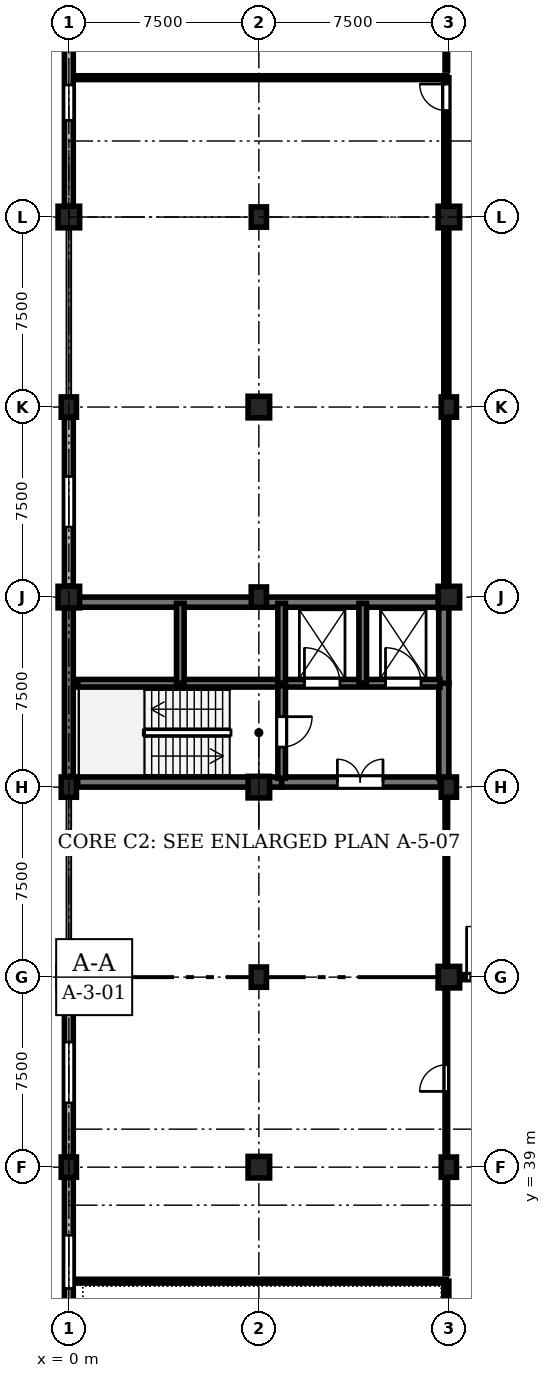
"""IFC4 building model, lengths in metres.
Left out: names, types, materials, properties, quantities, classifications, styles, units other than length and angle.
Written with IfcOpenShell. Run it as: python <this file> out.ifc"""

import sys

from ifc_helpers import new_model, si_unit, direction, frame, frame_2d, origin, origin_2d, place, context, subcontext, project, spatial, rectangle, extrude, element, fill, save


model = new_model("IFC4")
c1 = context("Model", 3, precision=1e-05, world=origin(), true_north=direction((0.0, 1.0)))
c2 = subcontext(c1, "Body", "Model", "MODEL_VIEW")
j1 = project(units=[si_unit("LENGTHUNIT", "METRE"), si_unit("PLANEANGLEUNIT", "RADIAN")], contexts=[c1])
p1 = place(None, origin())
s1 = spatial("IfcSite", under=j1, at=p1, CompositionType="ELEMENT")
p2 = place(p1, origin())
s2 = spatial("IfcBuilding", under=s1, at=p2, CompositionType="ELEMENT")
p3 = place(p2, frame((0.0, 0.0, 4.8)))
s3 = spatial("IfcBuildingStorey", under=s2, at=p3, CompositionType="ELEMENT", Elevation=4.8)
p4 = place(p3, frame((0.0, 39.0, 0.0), z_axis=(0.0, 0.0, 1.0), x_axis=(1.0, 0.0, 0.0)))
e1 = element("IfcColumn", 1, at=p4, inside=s3, PredefinedType="COLUMN", context=c2, shape_type="SweptSolid", body=[
    extrude(rectangle(XDim=0.6, YDim=0.8, at=origin_2d()), origin(), (0.0, 0.0, 1.0), 4.5),
])
p5 = place(p3, frame((0.0, 46.5, 0.0), z_axis=(0.0, 0.0, 1.0), x_axis=(1.0, 0.0, 0.0)))
e2 = element("IfcColumn", 2, at=p5, inside=s3, PredefinedType="COLUMN", context=c2, shape_type="SweptSolid", body=[
    extrude(rectangle(XDim=0.85, YDim=0.85, at=origin_2d()), origin(), (0.0, 0.0, 1.0), 4.5),
])
p6 = place(p3, frame((0.0, 54.0, 0.0), z_axis=(0.0, 0.0, 1.0), x_axis=(1.0, 0.0, 0.0)))
e3 = element("IfcColumn", 3, at=p6, inside=s3, PredefinedType="COLUMN", context=c2, shape_type="SweptSolid", body=[
    extrude(rectangle(XDim=0.6, YDim=0.8, at=origin_2d()), origin(), (0.0, 0.0, 1.0), 4.5),
])
p7 = place(p3, frame((0.0, 61.5, 0.0), z_axis=(0.0, 0.0, 1.0), x_axis=(1.0, 0.0, 0.0)))
e4 = element("IfcColumn", 4, at=p7, inside=s3, PredefinedType="COLUMN", context=c2, shape_type="SweptSolid", body=[
    extrude(rectangle(XDim=0.85, YDim=0.85, at=origin_2d()), origin(), (0.0, 0.0, 1.0), 4.5),
])
p8 = place(p3, frame((0.0, 69.0, 0.0), z_axis=(0.0, 0.0, 1.0), x_axis=(1.0, 0.0, 0.0)))
e5 = element("IfcColumn", 5, at=p8, inside=s3, PredefinedType="COLUMN", context=c2, shape_type="SweptSolid", body=[
    extrude(rectangle(XDim=0.6, YDim=0.8, at=origin_2d()), origin(), (0.0, 0.0, 1.0), 4.5),
])
for number, where, z_axis, x_axis in (
    (6, (0.0, 76.5, 0.0), (0.0, 0.0, 1.0), (1.0, 0.0, 0.0)),
    (7, (7.5, 39.0, 0.0), (0.0, 0.0, 1.0), (1.0, 0.0, 0.0)),
):
    element("IfcColumn", number, at=place(p3, frame(where, z_axis=z_axis, x_axis=x_axis)), inside=s3, PredefinedType="COLUMN", context=c2, shape_type="SweptSolid", body=[
        extrude(rectangle(XDim=0.85, YDim=0.85, at=origin_2d()), origin(), (0.0, 0.0, 1.0), 4.5),
    ])
p9 = place(p3, frame((7.5, 46.5, 0.0), z_axis=(0.0, 0.0, 1.0), x_axis=(1.0, 0.0, 0.0)))
e8 = element("IfcColumn", 8, at=p9, inside=s3, PredefinedType="COLUMN", context=c2, shape_type="SweptSolid", body=[
    extrude(rectangle(XDim=0.6, YDim=0.8, at=origin_2d()), origin(), (0.0, 0.0, 1.0), 4.5),
])
p10 = place(p3, frame((7.5, 54.0, 0.0), z_axis=(0.0, 0.0, 1.0), x_axis=(1.0, 0.0, 0.0)))
e9 = element("IfcColumn", 9, at=p10, inside=s3, PredefinedType="COLUMN", context=c2, shape_type="SweptSolid", body=[
    extrude(rectangle(XDim=0.85, YDim=0.85, at=origin_2d()), origin(), (0.0, 0.0, 1.0), 4.5),
])
p11 = place(p3, frame((7.5, 61.5, 0.0), z_axis=(0.0, 0.0, 1.0), x_axis=(1.0, 0.0, 0.0)))
e10 = element("IfcColumn", 10, at=p11, inside=s3, PredefinedType="COLUMN", context=c2, shape_type="SweptSolid", body=[
    extrude(rectangle(XDim=0.6, YDim=0.8, at=origin_2d()), origin(), (0.0, 0.0, 1.0), 4.5),
])
p12 = place(p3, frame((7.5, 69.0, 0.0), z_axis=(0.0, 0.0, 1.0), x_axis=(1.0, 0.0, 0.0)))
e11 = element("IfcColumn", 11, at=p12, inside=s3, PredefinedType="COLUMN", context=c2, shape_type="SweptSolid", body=[
    extrude(rectangle(XDim=0.85, YDim=0.85, at=origin_2d()), origin(), (0.0, 0.0, 1.0), 4.5),
])
for number, where, z_axis, x_axis in (
    (12, (7.5, 76.5, 0.0), (0.0, 0.0, 1.0), (1.0, 0.0, 0.0)),
    (13, (15.0, 39.0, 0.0), (0.0, 0.0, 1.0), (1.0, 0.0, 0.0)),
):
    element("IfcColumn", number, at=place(p3, frame(where, z_axis=z_axis, x_axis=x_axis)), inside=s3, PredefinedType="COLUMN", context=c2, shape_type="SweptSolid", body=[
        extrude(rectangle(XDim=0.6, YDim=0.8, at=origin_2d()), origin(), (0.0, 0.0, 1.0), 4.5),
    ])
p13 = place(p3, frame((15.0, 46.5, 0.0), z_axis=(0.0, 0.0, 1.0), x_axis=(1.0, 0.0, 0.0)))
e14 = element("IfcColumn", 14, at=p13, inside=s3, PredefinedType="COLUMN", context=c2, shape_type="SweptSolid", body=[
    extrude(rectangle(XDim=0.85, YDim=0.85, at=origin_2d()), origin(), (0.0, 0.0, 1.0), 4.5),
])
p14 = place(p3, frame((15.0, 54.0, 0.0), z_axis=(0.0, 0.0, 1.0), x_axis=(1.0, 0.0, 0.0)))
e15 = element("IfcColumn", 15, at=p14, inside=s3, PredefinedType="COLUMN", context=c2, shape_type="SweptSolid", body=[
    extrude(rectangle(XDim=0.6, YDim=0.8, at=origin_2d()), origin(), (0.0, 0.0, 1.0), 4.5),
])
p15 = place(p3, frame((15.0, 61.5, 0.0), z_axis=(0.0, 0.0, 1.0), x_axis=(1.0, 0.0, 0.0)))
e16 = element("IfcColumn", 16, at=p15, inside=s3, PredefinedType="COLUMN", context=c2, shape_type="SweptSolid", body=[
    extrude(rectangle(XDim=0.85, YDim=0.85, at=origin_2d()), origin(), (0.0, 0.0, 1.0), 4.5),
])
p16 = place(p3, frame((15.0, 69.0, 0.0), z_axis=(0.0, 0.0, 1.0), x_axis=(1.0, 0.0, 0.0)))
e17 = element("IfcColumn", 17, at=p16, inside=s3, PredefinedType="COLUMN", context=c2, shape_type="SweptSolid", body=[
    extrude(rectangle(XDim=0.6, YDim=0.8, at=origin_2d()), origin(), (0.0, 0.0, 1.0), 4.5),
])
p17 = place(p3, frame((15.0, 76.5, 0.0), z_axis=(0.0, 0.0, 1.0), x_axis=(1.0, 0.0, 0.0)))
e18 = element("IfcColumn", 18, at=p17, inside=s3, PredefinedType="COLUMN", context=c2, shape_type="SweptSolid", body=[
    extrude(rectangle(XDim=0.85, YDim=0.85, at=origin_2d()), origin(), (0.0, 0.0, 1.0), 4.5),
])
p18 = place(p3, frame((0.0, 31.935, 0.0), z_axis=(0.0, 0.0, 1.0), x_axis=(0.0, 1.0, 0.0)))
e19 = element("IfcWall", 19, at=p18, inside=s3, PredefinedType="STANDARD", context=c2, shape_type="SweptSolid", body=[
    extrude(rectangle(XDim=6.655, YDim=0.35, at=frame_2d((3.328, 0.0))), origin(), (0.0, 0.0, 1.0), 3.63),
])
p19 = place(p18, frame((2.278, 0.0, 0.9)))
e20 = element("IfcOpeningElement", 20, at=p19, cuts=e19, PredefinedType="OPENING", context=c2, shape_type="SweptSolid", body=[
    extrude(rectangle(XDim=2.1, YDim=2.1, at=frame_2d((1.05, 1.05))), frame((0.0, 0.185, 0.0), z_axis=(0.0, -1.0, 0.0), x_axis=(1.0, 0.0, 0.0)), (0.0, 0.0, 1.0), 0.37),
])
p20 = place(p3, frame((0.0, 39.41, 0.0), z_axis=(0.0, 0.0, 1.0), x_axis=(0.0, 1.0, 0.0)))
e21 = element("IfcWall", 21, at=p20, inside=s3, PredefinedType="STANDARD", context=c2, shape_type="SweptSolid", body=[
    extrude(rectangle(XDim=6.655, YDim=0.35, at=frame_2d((3.328, 0.0))), origin(), (0.0, 0.0, 1.0), 3.63),
])
p21 = place(p20, frame((2.127, 0.0, 0.9)))
e22 = element("IfcOpeningElement", 22, at=p21, cuts=e21, PredefinedType="OPENING", context=c2, shape_type="SweptSolid", body=[
    extrude(rectangle(XDim=2.4, YDim=2.1, at=frame_2d((1.2, 1.05))), frame((0.0, 0.185, 0.0), z_axis=(0.0, -1.0, 0.0), x_axis=(1.0, 0.0, 0.0)), (0.0, 0.0, 1.0), 0.37),
])
p22 = place(p3, frame((0.0, 54.41, 0.0), z_axis=(0.0, 0.0, 1.0), x_axis=(0.0, 1.0, 0.0)))
e23 = element("IfcWall", 23, at=p22, inside=s3, PredefinedType="SHEAR", context=c2, shape_type="SweptSolid", body=[
    extrude(rectangle(XDim=6.655, YDim=0.35, at=frame_2d((3.328, 0.0))), origin(), (0.0, 0.0, 1.0), 4.18),
])
p23 = place(p3, frame((0.0, 61.935, 0.0), z_axis=(0.0, 0.0, 1.0), x_axis=(0.0, 1.0, 0.0)))
e24 = element("IfcWall", 24, at=p23, inside=s3, PredefinedType="STANDARD", context=c2, shape_type="SweptSolid", body=[
    extrude(rectangle(XDim=6.655, YDim=0.35, at=frame_2d((3.328, 0.0))), origin(), (0.0, 0.0, 1.0), 3.63),
])
p24 = place(p23, frame((2.327, 0.0, 0.9)))
e25 = element("IfcOpeningElement", 25, at=p24, cuts=e24, PredefinedType="OPENING", context=c2, shape_type="SweptSolid", body=[
    extrude(rectangle(XDim=2.0, YDim=1.95, at=frame_2d((1.0, 0.975))), frame((0.0, 0.185, 0.0), z_axis=(0.0, -1.0, 0.0), x_axis=(1.0, 0.0, 0.0)), (0.0, 0.0, 1.0), 0.37),
])
p25 = place(p3, frame((0.0, 76.935, 0.0), z_axis=(0.0, 0.0, 1.0), x_axis=(0.0, 1.0, 0.0)))
e26 = element("IfcWall", 26, at=p25, inside=s3, PredefinedType="STANDARD", context=c2, shape_type="SweptSolid", body=[
    extrude(rectangle(XDim=8.155, YDim=0.35, at=frame_2d((4.078, 0.0))), origin(), (0.0, 0.0, 1.0), 3.63),
])
p26 = place(p25, frame((3.377, 0.0, 0.9)))
e27 = element("IfcOpeningElement", 27, at=p26, cuts=e26, PredefinedType="OPENING", context=c2, shape_type="SweptSolid", body=[
    extrude(rectangle(XDim=1.4, YDim=1.8, at=frame_2d((0.7, 0.9))), frame((0.0, 0.185, 0.0), z_axis=(0.0, -1.0, 0.0), x_axis=(1.0, 0.0, 0.0)), (0.0, 0.0, 1.0), 0.37),
])
p27 = place(p3, frame((0.35, 54.2, 0.0), z_axis=(0.0, 0.0, 1.0), x_axis=(1.0, 0.0, 0.0)))
e28 = element("IfcWall", 28, at=p27, inside=s3, PredefinedType="SHEAR", context=c2, shape_type="SweptSolid", body=[
    extrude(rectangle(XDim=8.05, YDim=0.4, at=frame_2d((4.025, 0.0))), origin(), (0.0, 0.0, 1.0), 4.18),
])
p28 = place(p3, frame((8.4, 54.2, 0.0), z_axis=(0.0, 0.0, 1.0), x_axis=(1.0, 0.0, 0.0)))
e29 = element("IfcWall", 29, at=p28, inside=s3, PredefinedType="SHEAR", context=c2, shape_type="SweptSolid", body=[
    extrude(rectangle(XDim=6.25, YDim=0.4, at=frame_2d((3.125, 0.0))), origin(), (0.0, 0.0, 1.0), 4.18),
])
p29 = place(p28, frame((2.2, 0.0, 0.0)))
e30 = element("IfcOpeningElement", 30, at=p29, cuts=e29, PredefinedType="OPENING", context=c2, shape_type="SweptSolid", body=[
    extrude(rectangle(XDim=1.8, YDim=2.25, at=frame_2d((0.9, 1.125))), frame((0.0, 0.21, 0.0), z_axis=(0.0, -1.0, 0.0), x_axis=(1.0, 0.0, 0.0)), (0.0, 0.0, 1.0), 0.42),
])
p30 = place(p3, frame((0.35, 61.3, 0.0), z_axis=(0.0, 0.0, 1.0), x_axis=(1.0, 0.0, 0.0)))
e31 = element("IfcWall", 31, at=p30, inside=s3, PredefinedType="SHEAR", context=c2, shape_type="SweptSolid", body=[
    extrude(rectangle(XDim=14.3, YDim=0.4, at=frame_2d((7.15, 0.0))), origin(), (0.0, 0.0, 1.0), 4.18),
])
p31 = place(p3, frame((14.8, 54.35, 0.0), z_axis=(0.0, 0.0, 1.0), x_axis=(0.0, 1.0, 0.0)))
e32 = element("IfcWall", 32, at=p31, inside=s3, PredefinedType="SHEAR", context=c2, shape_type="SweptSolid", body=[
    extrude(rectangle(XDim=3.75, YDim=0.4, at=frame_2d((1.875, 0.0))), origin(), (0.0, 0.0, 1.0), 4.18),
])
p32 = place(p3, frame((14.8, 58.1, 0.0), z_axis=(0.0, 0.0, 1.0), x_axis=(0.0, 1.0, 0.0)))
e33 = element("IfcWall", 33, at=p32, inside=s3, PredefinedType="SHEAR", context=c2, shape_type="SweptSolid", body=[
    extrude(rectangle(XDim=3.05, YDim=0.4, at=frame_2d((1.525, 0.0))), origin(), (0.0, 0.0, 1.0), 4.18),
])
p33 = place(p3, frame((0.35, 58.1, 0.0), z_axis=(0.0, 0.0, 1.0), x_axis=(1.0, 0.0, 0.0)))
e34 = element("IfcWall", 34, at=p33, inside=s3, PredefinedType="SHEAR", context=c2, shape_type="SweptSolid", body=[
    extrude(rectangle(XDim=8.05, YDim=0.3, at=frame_2d((4.025, 0.0))), origin(), (0.0, 0.0, 1.0), 4.18),
])
p34 = place(p3, frame((8.4, 58.1, 0.0), z_axis=(0.0, 0.0, 1.0), x_axis=(1.0, 0.0, 0.0)))
e35 = element("IfcWall", 35, at=p34, inside=s3, PredefinedType="SHEAR", context=c2, shape_type="SweptSolid", body=[
    extrude(rectangle(XDim=6.25, YDim=0.3, at=frame_2d((3.125, 0.0))), origin(), (0.0, 0.0, 1.0), 4.18),
])
p35 = place(p34, frame((0.9, 0.0, 0.0)))
e36 = element("IfcOpeningElement", 36, at=p35, cuts=e35, PredefinedType="OPENING", context=c2, shape_type="SweptSolid", body=[
    extrude(rectangle(XDim=1.4, YDim=2.25, at=frame_2d((0.7, 1.125))), frame((0.0, 0.16, 0.0), z_axis=(0.0, -1.0, 0.0), x_axis=(1.0, 0.0, 0.0)), (0.0, 0.0, 1.0), 0.32),
])
p36 = place(p34, frame((4.1, 0.0, 0.0)))
e37 = element("IfcOpeningElement", 37, at=p36, cuts=e35, PredefinedType="OPENING", context=c2, shape_type="SweptSolid", body=[
    extrude(rectangle(XDim=1.4, YDim=2.25, at=frame_2d((0.7, 1.125))), frame((0.0, 0.16, 0.0), z_axis=(0.0, -1.0, 0.0), x_axis=(1.0, 0.0, 0.0)), (0.0, 0.0, 1.0), 0.32),
])
p37 = place(p3, frame((8.4, 58.0, 0.0), z_axis=(0.0, 0.0, 1.0), x_axis=(0.0, -1.0, 0.0)))
e38 = element("IfcWall", 38, at=p37, inside=s3, PredefinedType="SHEAR", context=c2, shape_type="SweptSolid", body=[
    extrude(rectangle(XDim=3.65, YDim=0.3, at=frame_2d((1.825, 0.0))), origin(), (0.0, 0.0, 1.0), 4.18),
])
p38 = place(p37, frame((1.22, 0.0, 0.0)))
e39 = element("IfcOpeningElement", 39, at=p38, cuts=e38, PredefinedType="OPENING", context=c2, shape_type="SweptSolid", body=[
    extrude(rectangle(XDim=1.2, YDim=2.25, at=frame_2d((0.6, 1.125))), frame((0.0, 0.16, 0.0), z_axis=(0.0, -1.0, 0.0), x_axis=(1.0, 0.0, 0.0)), (0.0, 0.0, 1.0), 0.32),
])
for number, where, z_axis, x_axis in (
    (40, (4.4, 58.1, 0.0), (0.0, 0.0, 1.0), (0.0, 1.0, 0.0)),
    (41, (8.4, 58.1, 0.0), (0.0, 0.0, 1.0), (0.0, 1.0, 0.0)),
    (42, (11.6, 58.1, 0.0), (0.0, 0.0, 1.0), (0.0, 1.0, 0.0)),
):
    element("IfcWall", number, at=place(p3, frame(where, z_axis=z_axis, x_axis=x_axis)), inside=s3, PredefinedType="SHEAR", context=c2, shape_type="SweptSolid", body=[
        extrude(rectangle(XDim=3.15, YDim=0.3, at=frame_2d((1.575, 0.0))), origin(), (0.0, 0.0, 1.0), 4.18),
    ])
p39 = place(p3, frame((14.9, 15.3, 0.0), z_axis=(0.0, 0.0, 1.0), x_axis=(0.0, 1.0, 0.0)))
e43 = element("IfcWall", 43, at=p39, inside=s3, PredefinedType="STANDARD", context=c2, shape_type="SweptSolid", body=[
    extrude(rectangle(XDim=19.2, YDim=0.2, at=frame_2d((9.6, 0.0))), origin(), (0.0, 0.0, 1.0), 3.465),
])
p40 = place(p39, frame((10.21, 0.0, 0.0)))
e44 = element("IfcOpeningElement", 44, at=p40, cuts=e43, PredefinedType="OPENING", context=c2, shape_type="SweptSolid", body=[
    extrude(rectangle(XDim=2.1, YDim=2.4, at=frame_2d((1.05, 1.2))), frame((0.0, 0.11, 0.0), z_axis=(0.0, -1.0, 0.0), x_axis=(1.0, 0.0, 0.0)), (0.0, 0.0, 1.0), 0.22),
])
p41 = place(p3, frame((14.9, 34.8, 0.0), z_axis=(0.0, 0.0, 1.0), x_axis=(0.0, 1.0, 0.0)))
e45 = element("IfcWall", 45, at=p41, inside=s3, PredefinedType="PARTITIONING", context=c2, shape_type="SweptSolid", body=[
    extrude(rectangle(XDim=18.9, YDim=0.1, at=frame_2d((9.45, 0.0))), origin(), (0.0, 0.0, 1.0), 3.565),
])
p42 = place(p41, frame((7.19, 0.0, 0.0)))
e46 = element("IfcOpeningElement", 46, at=p42, cuts=e45, PredefinedType="OPENING", context=c2, shape_type="SweptSolid", body=[
    extrude(rectangle(XDim=1.05, YDim=2.2, at=frame_2d((0.525, 1.1))), frame((0.0, 0.06, 0.0), z_axis=(0.0, -1.0, 0.0), x_axis=(1.0, 0.0, 0.0)), (0.0, 0.0, 1.0), 0.12),
])
p43 = place(p3, frame((14.9, 61.8, 0.0), z_axis=(0.0, 0.0, 1.0), x_axis=(0.0, 1.0, 0.0)))
e47 = element("IfcWall", 47, at=p43, inside=s3, PredefinedType="STANDARD", context=c2, shape_type="SweptSolid", body=[
    extrude(rectangle(XDim=20.2, YDim=0.2, at=frame_2d((10.1, 0.0))), origin(), (0.0, 0.0, 1.0), 3.465),
])
p44 = place(p43, frame((18.9, 0.0, 0.0)))
e48 = element("IfcOpeningElement", 48, at=p44, cuts=e47, PredefinedType="OPENING", context=c2, shape_type="SweptSolid", body=[
    extrude(rectangle(XDim=1.05, YDim=2.2, at=frame_2d((0.525, 1.1))), frame((0.0, 0.11, 0.0), z_axis=(0.0, -1.0, 0.0), x_axis=(1.0, 0.0, 0.0)), (0.0, 0.0, 1.0), 0.22),
])
p45 = place(p3, frame((14.9, 82.3, 0.0), z_axis=(0.0, 0.0, 1.0), x_axis=(0.0, 1.0, 0.0)))
e49 = element("IfcWall", 49, at=p45, inside=s3, PredefinedType="PARTITIONING", context=c2, shape_type="SweptSolid", body=[
    extrude(rectangle(XDim=10.2, YDim=0.1, at=frame_2d((5.1, 0.0))), origin(), (0.0, 0.0, 1.0), 3.465),
])
p46 = place(p45, frame((6.375, 0.0, 0.0)))
e50 = element("IfcOpeningElement", 50, at=p46, cuts=e49, PredefinedType="OPENING", context=c2, shape_type="SweptSolid", body=[
    extrude(rectangle(XDim=0.95, YDim=2.15, at=frame_2d((0.475, 1.075))), frame((0.0, 0.06, 0.0), z_axis=(0.0, -1.0, 0.0), x_axis=(1.0, 0.0, 0.0)), (0.0, 0.0, 1.0), 0.12),
])
for number, where, z_axis, x_axis in (
    (51, (0.35, 34.5, 0.0), (0.0, 0.0, 1.0), (1.0, 0.0, 0.0)),
    (52, (0.35, 82.0, 0.0), (0.0, 0.0, 1.0), (1.0, 0.0, 0.0)),
):
    element("IfcWall", number, at=place(p3, frame(where, z_axis=z_axis, x_axis=x_axis)), inside=s3, PredefinedType="PARTITIONING", context=c2, shape_type="SweptSolid", body=[
        extrude(rectangle(XDim=14.55, YDim=0.15, at=frame_2d((7.275, 0.0))), origin(), (0.0, 0.0, 1.0), 4.165),
    ])
p47 = place(p3, frame((15.2, 46.5, 0.0), z_axis=(0.0, 0.0, 1.0), x_axis=(1.0, 0.0, 0.0)))
e53 = element("IfcWall", 53, at=p47, inside=s3, PredefinedType="STANDARD", context=c2, shape_type="SweptSolid", body=[
    extrude(rectangle(XDim=3.0, YDim=0.2, at=frame_2d((1.5, 0.0))), origin(), (0.0, 0.0, 1.0), 3.515),
])
p48 = place(p47, frame((0.5, 0.0, 0.0)))
e54 = element("IfcOpeningElement", 54, at=p48, cuts=e53, PredefinedType="OPENING", context=c2, shape_type="SweptSolid", body=[
    extrude(rectangle(XDim=2.0, YDim=2.3, at=frame_2d((1.0, 1.15))), frame((0.0, 0.11, 0.0), z_axis=(0.0, -1.0, 0.0), x_axis=(1.0, 0.0, 0.0)), (0.0, 0.0, 1.0), 0.22),
])
p49 = place(p19, origin())
e55 = element("IfcWindow", 55, at=p49, inside=s3, PartitioningType="SINGLE_PANEL", PredefinedType="WINDOW", context=c2, shape_type="SweptSolid", body=[
    extrude(rectangle(XDim=2.1, YDim=2.1, at=frame_2d((1.05, 1.05))), frame((0.0, 0.03, 0.0), z_axis=(0.0, -1.0, 0.0), x_axis=(1.0, 0.0, 0.0)), (0.0, 0.0, 1.0), 0.06),
])
fill(e20, e55)
p50 = place(p21, origin())
e56 = element("IfcWindow", 56, at=p50, inside=s3, PartitioningType="SINGLE_PANEL", PredefinedType="WINDOW", context=c2, shape_type="SweptSolid", body=[
    extrude(rectangle(XDim=2.4, YDim=2.1, at=frame_2d((1.2, 1.05))), frame((0.0, 0.03, 0.0), z_axis=(0.0, -1.0, 0.0), x_axis=(1.0, 0.0, 0.0)), (0.0, 0.0, 1.0), 0.06),
])
fill(e22, e56)
p51 = place(p24, origin())
e57 = element("IfcWindow", 57, at=p51, inside=s3, PartitioningType="SINGLE_PANEL", PredefinedType="WINDOW", context=c2, shape_type="SweptSolid", body=[
    extrude(rectangle(XDim=2.0, YDim=1.95, at=frame_2d((1.0, 0.975))), frame((0.0, 0.03, 0.0), z_axis=(0.0, -1.0, 0.0), x_axis=(1.0, 0.0, 0.0)), (0.0, 0.0, 1.0), 0.06),
])
fill(e25, e57)
p52 = place(p26, origin())
e58 = element("IfcWindow", 58, at=p52, inside=s3, PartitioningType="SINGLE_PANEL", PredefinedType="WINDOW", context=c2, shape_type="SweptSolid", body=[
    extrude(rectangle(XDim=1.4, YDim=1.8, at=frame_2d((0.7, 0.9))), frame((0.0, 0.03, 0.0), z_axis=(0.0, -1.0, 0.0), x_axis=(1.0, 0.0, 0.0)), (0.0, 0.0, 1.0), 0.06),
])
fill(e27, e58)
p53 = place(p29, origin())
e59 = element("IfcDoor", 59, at=p53, inside=s3, OperationType="DOUBLE_DOOR_SINGLE_SWING", PredefinedType="DOOR", context=c2, shape_type="SweptSolid", body=[
    extrude(rectangle(XDim=1.8, YDim=2.25, at=frame_2d((0.9, 1.125))), frame((0.0, 0.025, 0.0), z_axis=(0.0, -1.0, 0.0), x_axis=(1.0, 0.0, 0.0)), (0.0, 0.0, 1.0), 0.05),
])
fill(e30, e59)
p54 = place(p35, origin())
e60 = element("IfcDoor", 60, at=p54, inside=s3, OperationType="DOUBLE_DOOR_SLIDING", PredefinedType="DOOR", context=c2, shape_type="SweptSolid", body=[
    extrude(rectangle(XDim=1.4, YDim=2.25, at=frame_2d((0.7, 1.125))), frame((0.0, 0.025, 0.0), z_axis=(0.0, -1.0, 0.0), x_axis=(1.0, 0.0, 0.0)), (0.0, 0.0, 1.0), 0.05),
])
fill(e36, e60)
p55 = place(p36, origin())
e61 = element("IfcDoor", 61, at=p55, inside=s3, OperationType="DOUBLE_DOOR_SLIDING", PredefinedType="DOOR", context=c2, shape_type="SweptSolid", body=[
    extrude(rectangle(XDim=1.4, YDim=2.25, at=frame_2d((0.7, 1.125))), frame((0.0, 0.025, 0.0), z_axis=(0.0, -1.0, 0.0), x_axis=(1.0, 0.0, 0.0)), (0.0, 0.0, 1.0), 0.05),
])
fill(e37, e61)
p56 = place(p38, origin())
e62 = element("IfcDoor", 62, at=p56, inside=s3, OperationType="SINGLE_SWING_LEFT", PredefinedType="DOOR", context=c2, shape_type="SweptSolid", body=[
    extrude(rectangle(XDim=1.2, YDim=2.25, at=frame_2d((0.6, 1.125))), frame((0.0, 0.025, 0.0), z_axis=(0.0, -1.0, 0.0), x_axis=(1.0, 0.0, 0.0)), (0.0, 0.0, 1.0), 0.05),
])
fill(e39, e62)
p57 = place(p42, origin())
e63 = element("IfcDoor", 63, at=p57, inside=s3, OperationType="SINGLE_SWING_LEFT", PredefinedType="DOOR", context=c2, shape_type="SweptSolid", body=[
    extrude(rectangle(XDim=1.05, YDim=2.2, at=frame_2d((0.525, 1.1))), frame((0.0, 0.025, 0.0), z_axis=(0.0, -1.0, 0.0), x_axis=(1.0, 0.0, 0.0)), (0.0, 0.0, 1.0), 0.05),
])
fill(e46, e63)
p58 = place(p44, origin())
e64 = element("IfcDoor", 64, at=p58, inside=s3, OperationType="SINGLE_SWING_RIGHT", PredefinedType="DOOR", context=c2, shape_type="SweptSolid", body=[
    extrude(rectangle(XDim=1.05, YDim=2.2, at=frame_2d((0.525, 1.1))), frame((0.0, 0.025, 0.0), z_axis=(0.0, -1.0, 0.0), x_axis=(1.0, 0.0, 0.0)), (0.0, 0.0, 1.0), 0.05),
])
fill(e48, e64)
p59 = place(p48, origin())
e65 = element("IfcDoor", 65, at=p59, inside=s3, OperationType="DOUBLE_DOOR_SINGLE_SWING", PredefinedType="DOOR", context=c2, shape_type="SweptSolid", body=[
    extrude(rectangle(XDim=2.0, YDim=2.3, at=frame_2d((1.0, 1.15))), frame((0.0, 0.025, 0.0), z_axis=(0.0, -1.0, 0.0), x_axis=(1.0, 0.0, 0.0)), (0.0, 0.0, 1.0), 0.05),
])
fill(e54, e65)
save(model, sys.argv[1])
